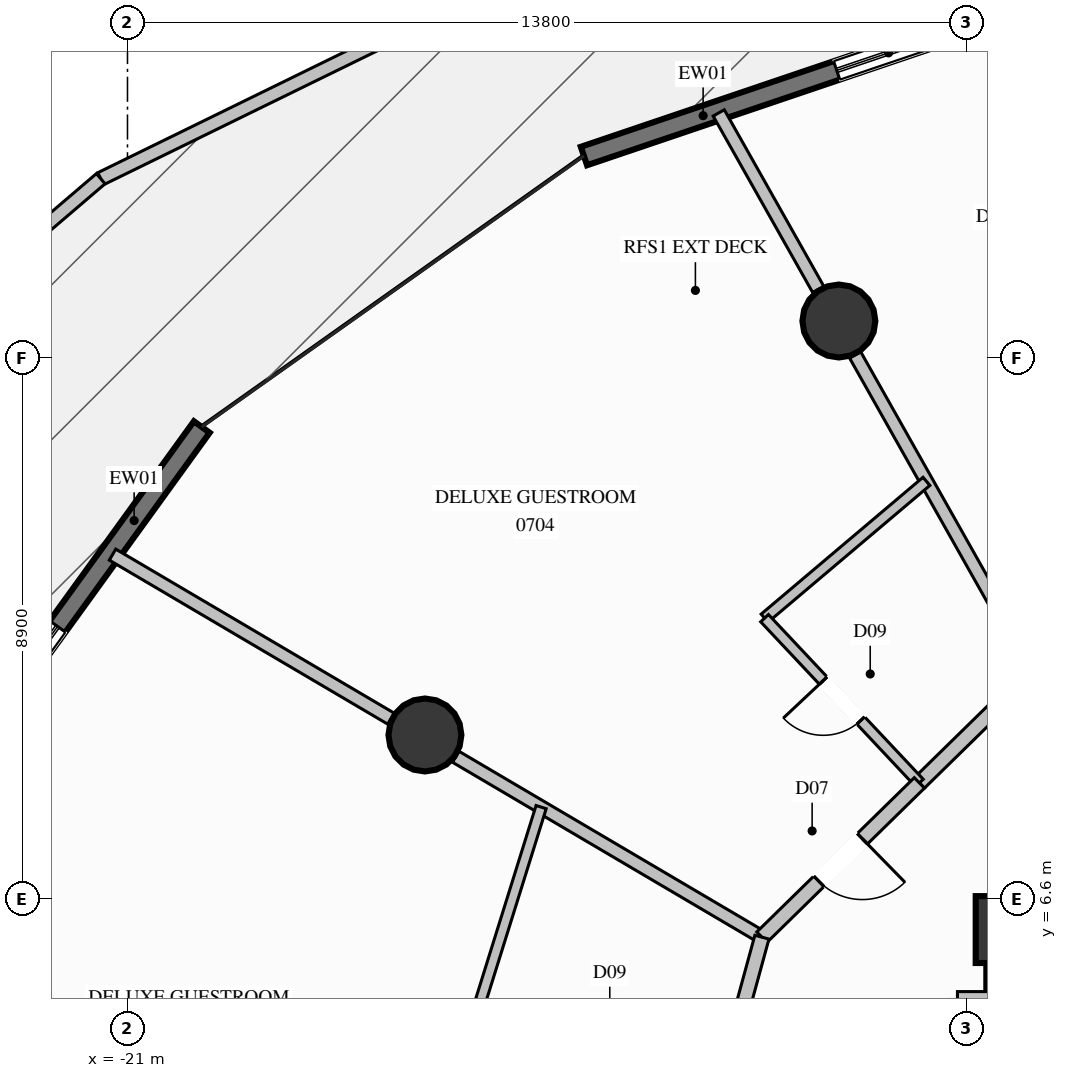
"""IFC4 building model, lengths in metres.
Left out: names, types, materials, properties, quantities, classifications, styles, units other than length and angle.
Written with IfcOpenShell. Run it as: python <this file> out.ifc"""

import sys

from ifc_helpers import new_model, si_unit, direction, frame, frame_2d, origin, origin_2d, place, context, subcontext, project, spatial, rectangle, circle, extrude, element, fill, save


model = new_model("IFC4")
c1 = context("Model", 3, precision=1e-05, world=origin(), true_north=direction((0.0, 1.0)))
c2 = subcontext(c1, "Body", "Model", "MODEL_VIEW")
j1 = project(units=[si_unit("LENGTHUNIT", "METRE"), si_unit("PLANEANGLEUNIT", "RADIAN")], contexts=[c1])
p1 = place(None, origin())
s1 = spatial("IfcSite", under=j1, at=p1, CompositionType="ELEMENT")
p2 = place(p1, origin())
s2 = spatial("IfcBuilding", under=s1, at=p2, CompositionType="ELEMENT")
p3 = place(p2, frame((0.0, 0.0, 28.4)))
s3 = spatial("IfcBuildingStorey", under=s2, at=p3, CompositionType="ELEMENT", Elevation=28.4)
p4 = place(p3, frame((-6.5, 6.1, 0.0), z_axis=(0.0, 0.0, 1.0), x_axis=(1.0, 0.0, 0.0)))
e1 = element("IfcColumn", 1, at=p4, inside=s3, PredefinedType="COLUMN", context=c2, shape_type="SweptSolid", body=[
    extrude(rectangle(XDim=1.1, YDim=1.1, at=origin_2d()), origin(), (0.0, 0.0, 1.0), 3.6),
])
p5 = place(p3, frame((-6.5, 2.35, 0.0), z_axis=(0.0, 0.0, 1.0), x_axis=(0.0, 1.0, 0.0)))
e2 = element("IfcWall", 2, at=p5, inside=s3, PredefinedType="SHEAR", context=c2, shape_type="SweptSolid", body=[
    extrude(rectangle(XDim=4.125, YDim=0.75, at=frame_2d((2.062, 0.0))), origin(), (0.0, 0.0, 1.0), 3.6),
])
for number, where, z_axis, x_axis in (
    (3, (-9.3, 16.108, 0.0), (0.0, 0.0, 1.0), (1.0, 0.0, 0.0)),
    (4, (-16.108, 9.3, 0.0), (0.0, 0.0, 1.0), (1.0, 0.0, 0.0)),
):
    element("IfcColumn", number, at=place(p3, frame(where, z_axis=z_axis, x_axis=x_axis)), inside=s3, PredefinedType="COLUMN", context=c2, shape_type="SweptSolid", body=[
        extrude(circle(Radius=0.6, at=origin_2d()), origin(), (0.0, 0.0, 1.0), 3.6),
    ])
p6 = place(p3, frame((-13.493, 18.821, 0.0), z_axis=(0.0, 0.0, 1.0), x_axis=(0.94717495877, 0.320717317085, 0.0)))
e5 = element("IfcWall", 5, at=p6, inside=s3, PredefinedType="SOLIDWALL", context=c2, shape_type="SweptSolid", body=[
    extrude(rectangle(XDim=8.151, YDim=0.32, at=frame_2d((4.075, 0.0))), origin(), (0.0, 0.0, 1.0), 3.34),
])
p7 = place(p6, frame((4.389, 0.0, 0.35)))
e6 = element("IfcOpeningElement", 6, at=p7, cuts=e5, PredefinedType="OPENING", context=c2, shape_type="SweptSolid", body=[
    extrude(rectangle(XDim=1.8, YDim=2.6, at=frame_2d((0.9, 1.3))), frame((0.0, 0.17, 0.0), z_axis=(0.0, -1.0, 0.0), x_axis=(1.0, 0.0, 0.0)), (0.0, 0.0, 1.0), 0.34),
])
p8 = place(p3, frame((-24.016, 8.503, 0.0), z_axis=(0.0, 0.0, 1.0), x_axis=(0.585883584877, 0.810395227634, 0.0)))
e7 = element("IfcWall", 7, at=p8, inside=s3, PredefinedType="SOLIDWALL", context=c2, shape_type="SweptSolid", body=[
    extrude(rectangle(XDim=7.234, YDim=0.32, at=frame_2d((3.617, 0.0))), origin(), (0.0, 0.0, 1.0), 3.34),
])
p9 = place(p8, frame((1.386, 0.0, 0.35)))
e8 = element("IfcOpeningElement", 8, at=p9, cuts=e7, PredefinedType="OPENING", context=c2, shape_type="SweptSolid", body=[
    extrude(rectangle(XDim=1.8, YDim=2.6, at=frame_2d((0.9, 1.3))), frame((0.0, 0.17, 0.0), z_axis=(0.0, -1.0, 0.0), x_axis=(1.0, 0.0, 0.0)), (0.0, 0.0, 1.0), 0.34),
])
p10 = place(p3, frame((-14.572, 21.809, 0.0), z_axis=(0.0, 0.0, 1.0), x_axis=(-0.898207066033, -0.439572595289, 0.0)))
e9 = element("IfcWall", 9, at=p10, inside=s3, PredefinedType="PARAPET", context=c2, shape_type="SweptSolid", body=[
    extrude(rectangle(XDim=7.646, YDim=0.22, at=frame_2d((3.823, 0.0))), origin(), (0.0, 0.0, 1.0), 1.15),
])
p11 = place(p3, frame((-21.44, 18.448, 0.0), z_axis=(0.0, 0.0, 1.0), x_axis=(-0.760343653317, -0.649520999553, 0.0)))
e10 = element("IfcWall", 10, at=p11, inside=s3, PredefinedType="PARAPET", context=c2, shape_type="SweptSolid", body=[
    extrude(rectangle(XDim=7.111, YDim=0.22, at=frame_2d((3.556, 0.0))), origin(), (0.0, 0.0, 1.0), 1.15),
])
p12 = place(p3, frame((-7.35, 4.95, 0.0), z_axis=(0.0, 0.0, 1.0), x_axis=(1.0, 0.0, 0.0)))
e11 = element("IfcWall", 11, at=p12, inside=s3, PredefinedType="PARTITIONING", context=c2, shape_type="SweptSolid", body=[
    extrude(rectangle(XDim=0.93, YDim=0.26, at=frame_2d((0.465, 0.0))), origin(), (0.0, 0.0, 1.0), 3.34),
])
p13 = place(p3, frame((-6.1, 10.349, 0.0), z_axis=(0.0, 0.0, 1.0), x_axis=(-0.491140594116, 0.871080315936, 0.0)))
e12 = element("IfcWall", 12, at=p13, inside=s3, PredefinedType="PARTITIONING", context=c2, shape_type="SweptSolid", body=[
    extrude(rectangle(XDim=5.969, YDim=0.21, at=frame_2d((2.985, 0.0))), origin(), (0.0, 0.0, 1.0), 2.708),
])
p14 = place(p3, frame((-9.639, 16.627, 0.0), z_axis=(0.0, 0.0, 1.0), x_axis=(-0.491168715891, 0.871064459457, 0.0)))
e13 = element("IfcWall", 13, at=p14, inside=s3, PredefinedType="PARTITIONING", context=c2, shape_type="SweptSolid", body=[
    extrude(rectangle(XDim=3.333, YDim=0.21, at=frame_2d((1.667, 0.0))), origin(), (0.0, 0.0, 1.0), 3.34),
])
p15 = place(p3, frame((-10.566, 5.975, 0.0), z_axis=(0.0, 0.0, 1.0), x_axis=(-0.86160761681, 0.507574935014, 0.0)))
e14 = element("IfcWall", 14, at=p15, inside=s3, PredefinedType="PARTITIONING", context=c2, shape_type="SweptSolid", body=[
    extrude(rectangle(XDim=5.845, YDim=0.21, at=frame_2d((2.922, 0.0))), origin(), (0.0, 0.0, 1.0), 2.708),
])
p16 = place(p3, frame((-16.667, 9.569, 0.0), z_axis=(0.0, 0.0, 1.0), x_axis=(-0.861651827739, 0.50749987956, 0.0)))
e15 = element("IfcWall", 15, at=p16, inside=s3, PredefinedType="PARTITIONING", context=c2, shape_type="SweptSolid", body=[
    extrude(rectangle(XDim=5.314, YDim=0.21, at=frame_2d((2.657, 0.0))), origin(), (0.0, 0.0, 1.0), 3.34),
])
p17 = place(p3, frame((-6.1, 10.349, 0.0), z_axis=(0.0, 0.0, 1.0), x_axis=(-0.714460071513, -0.69967621527, 0.0)))
e16 = element("IfcWall", 16, at=p17, inside=s3, PredefinedType="PARTITIONING", context=c2, shape_type="SweptSolid", body=[
    extrude(rectangle(XDim=2.626, YDim=0.24, at=frame_2d((1.313, 0.0))), origin(), (0.0, 0.0, 1.0), 3.34),
])
p18 = place(p3, frame((-7.86, 13.471, 0.0), z_axis=(0.0, 0.0, 1.0), x_axis=(-0.763718302061, -0.645549653471, 0.0)))
e17 = element("IfcWall", 17, at=p18, inside=s3, PredefinedType="PLUMBINGWALL", context=c2, shape_type="SweptSolid", body=[
    extrude(rectangle(XDim=3.485, YDim=0.175, at=frame_2d((1.743, 0.0))), origin(), (0.0, 0.0, 1.0), 3.34),
])
p19 = place(p3, frame((-7.976, 8.512, 0.0), z_axis=(0.0, 0.0, 1.0), x_axis=(-0.684831906404, 0.72870107724, 0.0)))
e18 = element("IfcWall", 18, at=p19, inside=s3, PredefinedType="PLUMBINGWALL", context=c2, shape_type="SweptSolid", body=[
    extrude(rectangle(XDim=3.718, YDim=0.175, at=frame_2d((1.859, 0.0))), origin(), (0.0, 0.0, 1.0), 3.34),
])
p20 = place(p19, frame((1.409, 0.0, 0.0)))
e19 = element("IfcOpeningElement", 19, at=p20, cuts=e18, PredefinedType="OPENING", context=c2, shape_type="SweptSolid", body=[
    extrude(rectangle(XDim=0.9, YDim=2.1, at=frame_2d((0.45, 1.05))), frame((0.0, 0.098, 0.0), z_axis=(0.0, -1.0, 0.0), x_axis=(1.0, 0.0, 0.0)), (0.0, 0.0, 1.0), 0.195),
])
p21 = place(p3, frame((-7.976, 8.512, 0.0), z_axis=(0.0, 0.0, 1.0), x_axis=(-0.714375756875, -0.699762301064, 0.0)))
e20 = element("IfcWall", 20, at=p21, inside=s3, PredefinedType="PARTITIONING", context=c2, shape_type="SweptSolid", body=[
    extrude(rectangle(XDim=3.625, YDim=0.24, at=frame_2d((1.812, 0.0))), origin(), (0.0, 0.0, 1.0), 3.34),
])
p22 = place(p21, frame((1.313, 0.0, 0.0)))
e21 = element("IfcOpeningElement", 21, at=p22, cuts=e20, PredefinedType="OPENING", context=c2, shape_type="SweptSolid", body=[
    extrude(rectangle(XDim=1.0, YDim=2.2, at=frame_2d((0.5, 1.1))), frame((0.0, 0.13, 0.0), z_axis=(0.0, -1.0, 0.0), x_axis=(1.0, 0.0, 0.0)), (0.0, 0.0, 1.0), 0.26),
])
p23 = place(p3, frame((-10.566, 5.975, 0.0), z_axis=(0.0, 0.0, 1.0), x_axis=(-0.263744763784, -0.964592504416, 0.0)))
e22 = element("IfcWall", 22, at=p23, inside=s3, PredefinedType="PARTITIONING", context=c2, shape_type="SweptSolid", body=[
    extrude(rectangle(XDim=2.601, YDim=0.24, at=frame_2d((1.301, 0.0))), origin(), (0.0, 0.0, 1.0), 3.34),
])
p24 = place(p3, frame((-14.197, 8.114, 0.0), z_axis=(0.0, 0.0, 1.0), x_axis=(-0.298014103634, -0.954561466871, 0.0)))
e23 = element("IfcWall", 23, at=p24, inside=s3, PredefinedType="PLUMBINGWALL", context=c2, shape_type="SweptSolid", body=[
    extrude(rectangle(XDim=3.57, YDim=0.175, at=frame_2d((1.785, 0.0))), origin(), (0.0, 0.0, 1.0), 3.34),
])
p25 = place(p7, origin())
e24 = element("IfcWindow", 24, at=p25, inside=s3, PartitioningType="SINGLE_PANEL", PredefinedType="WINDOW", context=c2, shape_type="SweptSolid", body=[
    extrude(rectangle(XDim=1.8, YDim=2.6, at=frame_2d((0.9, 1.3))), frame((0.0, 0.03, 0.0), z_axis=(0.0, -1.0, 0.0), x_axis=(1.0, 0.0, 0.0)), (0.0, 0.0, 1.0), 0.06),
])
fill(e6, e24)
p26 = place(p9, origin())
e25 = element("IfcWindow", 25, at=p26, inside=s3, PartitioningType="SINGLE_PANEL", PredefinedType="WINDOW", context=c2, shape_type="SweptSolid", body=[
    extrude(rectangle(XDim=1.8, YDim=2.6, at=frame_2d((0.9, 1.3))), frame((0.0, 0.03, 0.0), z_axis=(0.0, -1.0, 0.0), x_axis=(1.0, 0.0, 0.0)), (0.0, 0.0, 1.0), 0.06),
])
fill(e8, e25)
p27 = place(p20, origin())
e26 = element("IfcDoor", 26, at=p27, inside=s3, OperationType="SINGLE_SWING_RIGHT", PredefinedType="DOOR", context=c2, shape_type="SweptSolid", body=[
    extrude(rectangle(XDim=0.9, YDim=2.1, at=frame_2d((0.45, 1.05))), frame((0.0, 0.025, 0.0), z_axis=(0.0, -1.0, 0.0), x_axis=(1.0, 0.0, 0.0)), (0.0, 0.0, 1.0), 0.05),
])
fill(e19, e26)
p28 = place(p22, origin())
e27 = element("IfcDoor", 27, at=p28, inside=s3, OperationType="SINGLE_SWING_LEFT", PredefinedType="DOOR", context=c2, shape_type="SweptSolid", body=[
    extrude(rectangle(XDim=1.0, YDim=2.2, at=frame_2d((0.5, 1.1))), frame((0.0, 0.025, 0.0), z_axis=(0.0, -1.0, 0.0), x_axis=(1.0, 0.0, 0.0)), (0.0, 0.0, 1.0), 0.05),
])
fill(e21, e27)
save(model, sys.argv[1])
